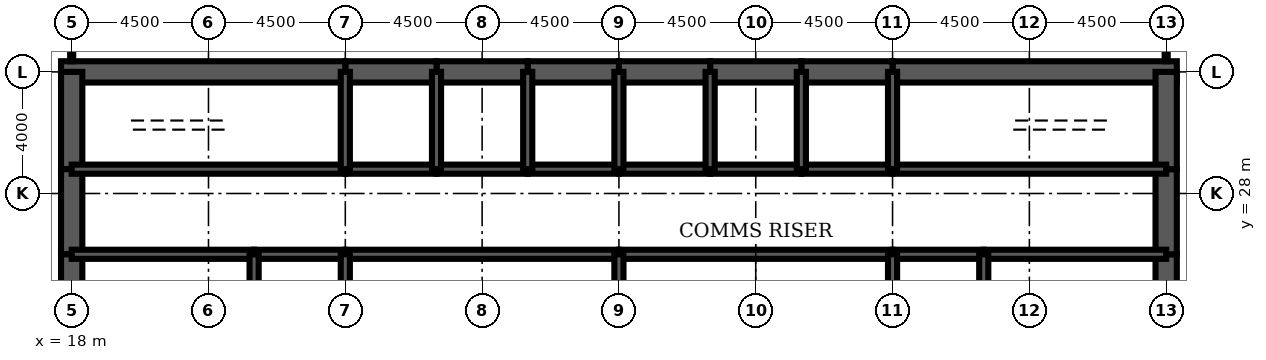
"""IFC4 building model, lengths in metres.
Left out: names, types, materials, properties, quantities, classifications, styles, units other than length and angle.
Written with IfcOpenShell. Run it as: python <this file> out.ifc"""

import sys

from ifc_helpers import new_model, si_unit, direction, frame, frame_2d, origin, place, context, subcontext, project, spatial, rectangle, extrude, element, fill, save


model = new_model("IFC4")
c1 = context("Model", 3, precision=1e-05, world=origin(), true_north=direction((0.0, 1.0)))
c2 = subcontext(c1, "Body", "Model", "MODEL_VIEW")
j1 = project(units=[si_unit("LENGTHUNIT", "METRE"), si_unit("PLANEANGLEUNIT", "RADIAN")], contexts=[c1])
p1 = place(None, origin())
s1 = spatial("IfcSite", under=j1, at=p1, CompositionType="ELEMENT")
p2 = place(p1, origin())
s2 = spatial("IfcBuilding", under=s1, at=p2, CompositionType="ELEMENT")
p3 = place(p2, frame((0.0, 0.0, 279.5)))
s3 = spatial("IfcBuildingStorey", under=s2, at=p3, CompositionType="ELEMENT", Elevation=279.5)
p4 = place(p3, frame((54.35, 32.0, 0.0), z_axis=(0.0, 0.0, 1.0), x_axis=(-1.0, 0.0, 0.0)))
e1 = element("IfcWall", 1, at=p4, inside=s3, PredefinedType="SHEAR", context=c2, shape_type="SweptSolid", body=[
    extrude(rectangle(XDim=9.35, YDim=0.7, at=frame_2d((4.675, 0.0))), origin(), (0.0, 0.0, 1.0), 4.2),
])
for number, where, z_axis, x_axis in (
    (2, (45.0, 32.0, 0.0), (0.0, 0.0, 1.0), (-1.0, 0.0, 0.0)),
    (3, (42.0, 32.0, 0.0), (0.0, 0.0, 1.0), (-1.0, 0.0, 0.0)),
    (4, (39.0, 32.0, 0.0), (0.0, 0.0, 1.0), (-1.0, 0.0, 0.0)),
    (5, (36.0, 32.0, 0.0), (0.0, 0.0, 1.0), (-1.0, 0.0, 0.0)),
    (6, (33.0, 32.0, 0.0), (0.0, 0.0, 1.0), (-1.0, 0.0, 0.0)),
    (7, (30.0, 32.0, 0.0), (0.0, 0.0, 1.0), (-1.0, 0.0, 0.0)),
):
    element("IfcWall", number, at=place(p3, frame(where, z_axis=z_axis, x_axis=x_axis)), inside=s3, PredefinedType="SHEAR", context=c2, shape_type="SweptSolid", body=[
        extrude(rectangle(XDim=3.0, YDim=0.7, at=frame_2d((1.5, 0.0))), origin(), (0.0, 0.0, 1.0), 4.2),
    ])
p5 = place(p3, frame((27.0, 32.0, 0.0), z_axis=(0.0, 0.0, 1.0), x_axis=(-1.0, 0.0, 0.0)))
e8 = element("IfcWall", 8, at=p5, inside=s3, PredefinedType="SHEAR", context=c2, shape_type="SweptSolid", body=[
    extrude(rectangle(XDim=9.35, YDim=0.7, at=frame_2d((4.675, 0.0))), origin(), (0.0, 0.0, 1.0), 4.2),
])
p6 = place(p3, frame((18.0, 32.0, 0.0), z_axis=(0.0, 0.0, 1.0), x_axis=(0.0, -1.0, 0.0)))
e9 = element("IfcWall", 9, at=p6, inside=s3, PredefinedType="SHEAR", context=c2, shape_type="SweptSolid", body=[
    extrude(rectangle(XDim=3.2, YDim=0.7, at=frame_2d((1.6, 0.0))), origin(), (0.0, 0.0, 1.0), 4.2),
])
p7 = place(p3, frame((18.0, 28.8, 0.0), z_axis=(0.0, 0.0, 1.0), x_axis=(0.0, -1.0, 0.0)))
e10 = element("IfcWall", 10, at=p7, inside=s3, PredefinedType="SHEAR", context=c2, shape_type="SweptSolid", body=[
    extrude(rectangle(XDim=2.8, YDim=0.7, at=frame_2d((1.4, 0.0))), origin(), (0.0, 0.0, 1.0), 4.2),
])
p8 = place(p7, frame((0.4, 0.0, 0.0)))
e11 = element("IfcOpeningElement", 11, at=p8, cuts=e10, PredefinedType="OPENING", context=c2, shape_type="SweptSolid", body=[
    extrude(rectangle(XDim=1.8, YDim=2.1, at=frame_2d((0.9, 1.05))), frame((0.0, 0.36, 0.0), z_axis=(0.0, -1.0, 0.0), x_axis=(1.0, 0.0, 0.0)), (0.0, 0.0, 1.0), 0.72),
])
for number, where, z_axis, x_axis in (
    (12, (18.0, 26.0, 0.0), (0.0, 0.0, 1.0), (0.0, -1.0, 0.0)),
    (13, (54.0, 22.0, 0.0), (0.0, 0.0, 1.0), (0.0, 1.0, 0.0)),
):
    element("IfcWall", number, at=place(p3, frame(where, z_axis=z_axis, x_axis=x_axis)), inside=s3, PredefinedType="SHEAR", context=c2, shape_type="SweptSolid", body=[
        extrude(rectangle(XDim=4.0, YDim=0.7, at=frame_2d((2.0, 0.0))), origin(), (0.0, 0.0, 1.0), 4.2),
    ])
p9 = place(p3, frame((54.0, 26.0, 0.0), z_axis=(0.0, 0.0, 1.0), x_axis=(0.0, 1.0, 0.0)))
e14 = element("IfcWall", 14, at=p9, inside=s3, PredefinedType="SHEAR", context=c2, shape_type="SweptSolid", body=[
    extrude(rectangle(XDim=2.8, YDim=0.7, at=frame_2d((1.4, 0.0))), origin(), (0.0, 0.0, 1.0), 4.2),
])
p10 = place(p9, frame((0.6, 0.0, 0.0)))
e15 = element("IfcOpeningElement", 15, at=p10, cuts=e14, PredefinedType="OPENING", context=c2, shape_type="SweptSolid", body=[
    extrude(rectangle(XDim=1.8, YDim=2.1, at=frame_2d((0.9, 1.05))), frame((0.0, 0.36, 0.0), z_axis=(0.0, -1.0, 0.0), x_axis=(1.0, 0.0, 0.0)), (0.0, 0.0, 1.0), 0.72),
])
p11 = place(p3, frame((54.0, 28.8, 0.0), z_axis=(0.0, 0.0, 1.0), x_axis=(0.0, 1.0, 0.0)))
e16 = element("IfcWall", 16, at=p11, inside=s3, PredefinedType="SHEAR", context=c2, shape_type="SweptSolid", body=[
    extrude(rectangle(XDim=3.2, YDim=0.7, at=frame_2d((1.6, 0.0))), origin(), (0.0, 0.0, 1.0), 4.2),
])
p12 = place(p3, frame((18.0, 28.8, 0.0), z_axis=(0.0, 0.0, 1.0), x_axis=(1.0, 0.0, 0.0)))
e17 = element("IfcWall", 17, at=p12, inside=s3, PredefinedType="SOLIDWALL", context=c2, shape_type="SweptSolid", body=[
    extrude(rectangle(XDim=9.0, YDim=0.3, at=frame_2d((4.5, 0.0))), origin(), (0.0, 0.0, 1.0), 4.2),
])
p13 = place(p12, frame((0.65, 0.0, 0.0)))
e18 = element("IfcOpeningElement", 18, at=p13, cuts=e17, PredefinedType="OPENING", context=c2, shape_type="SweptSolid", body=[
    extrude(rectangle(XDim=1.0, YDim=2.1, at=frame_2d((0.5, 1.05))), frame((0.0, 0.16, 0.0), z_axis=(0.0, -1.0, 0.0), x_axis=(1.0, 0.0, 0.0)), (0.0, 0.0, 1.0), 0.32),
])
p14 = place(p3, frame((27.0, 28.8, 0.0), z_axis=(0.0, 0.0, 1.0), x_axis=(1.0, 0.0, 0.0)))
e19 = element("IfcWall", 19, at=p14, inside=s3, PredefinedType="SOLIDWALL", context=c2, shape_type="SweptSolid", body=[
    extrude(rectangle(XDim=3.0, YDim=0.3, at=frame_2d((1.5, 0.0))), origin(), (0.0, 0.0, 1.0), 4.2),
])
p15 = place(p14, frame((0.95, 0.0, 0.0)))
e20 = element("IfcOpeningElement", 20, at=p15, cuts=e19, PredefinedType="OPENING", context=c2, shape_type="SweptSolid", body=[
    extrude(rectangle(XDim=1.1, YDim=2.2, at=frame_2d((0.55, 1.1))), frame((0.0, 0.16, 0.0), z_axis=(0.0, -1.0, 0.0), x_axis=(1.0, 0.0, 0.0)), (0.0, 0.0, 1.0), 0.32),
])
p16 = place(p3, frame((30.0, 28.8, 0.0), z_axis=(0.0, 0.0, 1.0), x_axis=(1.0, 0.0, 0.0)))
e21 = element("IfcWall", 21, at=p16, inside=s3, PredefinedType="SOLIDWALL", context=c2, shape_type="SweptSolid", body=[
    extrude(rectangle(XDim=3.0, YDim=0.3, at=frame_2d((1.5, 0.0))), origin(), (0.0, 0.0, 1.0), 4.2),
])
p17 = place(p16, frame((0.95, 0.0, 0.0)))
e22 = element("IfcOpeningElement", 22, at=p17, cuts=e21, PredefinedType="OPENING", context=c2, shape_type="SweptSolid", body=[
    extrude(rectangle(XDim=1.1, YDim=2.2, at=frame_2d((0.55, 1.1))), frame((0.0, 0.16, 0.0), z_axis=(0.0, -1.0, 0.0), x_axis=(1.0, 0.0, 0.0)), (0.0, 0.0, 1.0), 0.32),
])
p18 = place(p3, frame((33.0, 28.8, 0.0), z_axis=(0.0, 0.0, 1.0), x_axis=(1.0, 0.0, 0.0)))
e23 = element("IfcWall", 23, at=p18, inside=s3, PredefinedType="SOLIDWALL", context=c2, shape_type="SweptSolid", body=[
    extrude(rectangle(XDim=3.0, YDim=0.3, at=frame_2d((1.5, 0.0))), origin(), (0.0, 0.0, 1.0), 4.2),
])
p19 = place(p18, frame((0.95, 0.0, 0.0)))
e24 = element("IfcOpeningElement", 24, at=p19, cuts=e23, PredefinedType="OPENING", context=c2, shape_type="SweptSolid", body=[
    extrude(rectangle(XDim=1.1, YDim=2.2, at=frame_2d((0.55, 1.1))), frame((0.0, 0.16, 0.0), z_axis=(0.0, -1.0, 0.0), x_axis=(1.0, 0.0, 0.0)), (0.0, 0.0, 1.0), 0.32),
])
p20 = place(p3, frame((36.0, 28.8, 0.0), z_axis=(0.0, 0.0, 1.0), x_axis=(1.0, 0.0, 0.0)))
e25 = element("IfcWall", 25, at=p20, inside=s3, PredefinedType="SOLIDWALL", context=c2, shape_type="SweptSolid", body=[
    extrude(rectangle(XDim=3.0, YDim=0.3, at=frame_2d((1.5, 0.0))), origin(), (0.0, 0.0, 1.0), 4.2),
])
p21 = place(p20, frame((1.0, 0.0, 0.0)))
e26 = element("IfcOpeningElement", 26, at=p21, cuts=e25, PredefinedType="OPENING", context=c2, shape_type="SweptSolid", body=[
    extrude(rectangle(XDim=1.0, YDim=2.1, at=frame_2d((0.5, 1.05))), frame((0.0, 0.16, 0.0), z_axis=(0.0, -1.0, 0.0), x_axis=(1.0, 0.0, 0.0)), (0.0, 0.0, 1.0), 0.32),
])
p22 = place(p3, frame((39.0, 28.8, 0.0), z_axis=(0.0, 0.0, 1.0), x_axis=(1.0, 0.0, 0.0)))
e27 = element("IfcWall", 27, at=p22, inside=s3, PredefinedType="SOLIDWALL", context=c2, shape_type="SweptSolid", body=[
    extrude(rectangle(XDim=3.0, YDim=0.3, at=frame_2d((1.5, 0.0))), origin(), (0.0, 0.0, 1.0), 4.2),
])
p23 = place(p22, frame((1.0, 0.0, 0.0)))
e28 = element("IfcOpeningElement", 28, at=p23, cuts=e27, PredefinedType="OPENING", context=c2, shape_type="SweptSolid", body=[
    extrude(rectangle(XDim=1.0, YDim=2.1, at=frame_2d((0.5, 1.05))), frame((0.0, 0.16, 0.0), z_axis=(0.0, -1.0, 0.0), x_axis=(1.0, 0.0, 0.0)), (0.0, 0.0, 1.0), 0.32),
])
p24 = place(p3, frame((42.0, 28.8, 0.0), z_axis=(0.0, 0.0, 1.0), x_axis=(1.0, 0.0, 0.0)))
e29 = element("IfcWall", 29, at=p24, inside=s3, PredefinedType="SOLIDWALL", context=c2, shape_type="SweptSolid", body=[
    extrude(rectangle(XDim=3.0, YDim=0.3, at=frame_2d((1.5, 0.0))), origin(), (0.0, 0.0, 1.0), 4.2),
])
p25 = place(p24, frame((0.95, 0.0, 0.0)))
e30 = element("IfcOpeningElement", 30, at=p25, cuts=e29, PredefinedType="OPENING", context=c2, shape_type="SweptSolid", body=[
    extrude(rectangle(XDim=1.1, YDim=2.2, at=frame_2d((0.55, 1.1))), frame((0.0, 0.16, 0.0), z_axis=(0.0, -1.0, 0.0), x_axis=(1.0, 0.0, 0.0)), (0.0, 0.0, 1.0), 0.32),
])
p26 = place(p3, frame((45.0, 28.8, 0.0), z_axis=(0.0, 0.0, 1.0), x_axis=(1.0, 0.0, 0.0)))
e31 = element("IfcWall", 31, at=p26, inside=s3, PredefinedType="SOLIDWALL", context=c2, shape_type="SweptSolid", body=[
    extrude(rectangle(XDim=9.0, YDim=0.3, at=frame_2d((4.5, 0.0))), origin(), (0.0, 0.0, 1.0), 4.2),
])
p27 = place(p26, frame((7.35, 0.0, 0.0)))
e32 = element("IfcOpeningElement", 32, at=p27, cuts=e31, PredefinedType="OPENING", context=c2, shape_type="SweptSolid", body=[
    extrude(rectangle(XDim=1.0, YDim=2.1, at=frame_2d((0.5, 1.05))), frame((0.0, 0.16, 0.0), z_axis=(0.0, -1.0, 0.0), x_axis=(1.0, 0.0, 0.0)), (0.0, 0.0, 1.0), 0.32),
])
p28 = place(p3, frame((18.0, 26.0, 0.0), z_axis=(0.0, 0.0, 1.0), x_axis=(1.0, 0.0, 0.0)))
e33 = element("IfcWall", 33, at=p28, inside=s3, PredefinedType="SOLIDWALL", context=c2, shape_type="SweptSolid", body=[
    extrude(rectangle(XDim=6.0, YDim=0.3, at=frame_2d((3.0, 0.0))), origin(), (0.0, 0.0, 1.0), 4.2),
])
p29 = place(p3, frame((24.0, 26.0, 0.0), z_axis=(0.0, 0.0, 1.0), x_axis=(1.0, 0.0, 0.0)))
e34 = element("IfcWall", 34, at=p29, inside=s3, PredefinedType="SOLIDWALL", context=c2, shape_type="SweptSolid", body=[
    extrude(rectangle(XDim=3.0, YDim=0.3, at=frame_2d((1.5, 0.0))), origin(), (0.0, 0.0, 1.0), 4.2),
])
for number, where, z_axis, x_axis in (
    (35, (27.0, 26.0, 0.0), (0.0, 0.0, 1.0), (1.0, 0.0, 0.0)),
    (36, (36.0, 26.0, 0.0), (0.0, 0.0, 1.0), (1.0, 0.0, 0.0)),
):
    element("IfcWall", number, at=place(p3, frame(where, z_axis=z_axis, x_axis=x_axis)), inside=s3, PredefinedType="SOLIDWALL", context=c2, shape_type="SweptSolid", body=[
        extrude(rectangle(XDim=9.0, YDim=0.3, at=frame_2d((4.5, 0.0))), origin(), (0.0, 0.0, 1.0), 4.2),
    ])
p30 = place(p3, frame((45.0, 26.0, 0.0), z_axis=(0.0, 0.0, 1.0), x_axis=(1.0, 0.0, 0.0)))
e37 = element("IfcWall", 37, at=p30, inside=s3, PredefinedType="SOLIDWALL", context=c2, shape_type="SweptSolid", body=[
    extrude(rectangle(XDim=3.0, YDim=0.3, at=frame_2d((1.5, 0.0))), origin(), (0.0, 0.0, 1.0), 4.2),
])
p31 = place(p3, frame((48.0, 26.0, 0.0), z_axis=(0.0, 0.0, 1.0), x_axis=(1.0, 0.0, 0.0)))
e38 = element("IfcWall", 38, at=p31, inside=s3, PredefinedType="SOLIDWALL", context=c2, shape_type="SweptSolid", body=[
    extrude(rectangle(XDim=6.0, YDim=0.3, at=frame_2d((3.0, 0.0))), origin(), (0.0, 0.0, 1.0), 4.2),
])
for number, where, z_axis, x_axis in (
    (39, (27.0, 28.8, 0.0), (0.0, 0.0, 1.0), (0.0, 1.0, 0.0)),
    (40, (30.0, 28.8, 0.0), (0.0, 0.0, 1.0), (0.0, 1.0, 0.0)),
    (41, (33.0, 28.8, 0.0), (0.0, 0.0, 1.0), (0.0, 1.0, 0.0)),
    (42, (36.0, 28.8, 0.0), (0.0, 0.0, 1.0), (0.0, 1.0, 0.0)),
    (43, (39.0, 28.8, 0.0), (0.0, 0.0, 1.0), (0.0, 1.0, 0.0)),
    (44, (42.0, 28.8, 0.0), (0.0, 0.0, 1.0), (0.0, 1.0, 0.0)),
    (45, (45.0, 28.8, 0.0), (0.0, 0.0, 1.0), (0.0, 1.0, 0.0)),
):
    element("IfcWall", number, at=place(p3, frame(where, z_axis=z_axis, x_axis=x_axis)), inside=s3, PredefinedType="SOLIDWALL", context=c2, shape_type="SweptSolid", body=[
        extrude(rectangle(XDim=3.2, YDim=0.3, at=frame_2d((1.6, 0.0))), origin(), (0.0, 0.0, 1.0), 4.2),
    ])
for number, where, z_axis, x_axis in (
    (46, (24.0, 22.0, 0.0), (0.0, 0.0, 1.0), (0.0, 1.0, 0.0)),
    (47, (27.0, 22.0, 0.0), (0.0, 0.0, 1.0), (0.0, 1.0, 0.0)),
    (48, (36.0, 22.0, 0.0), (0.0, 0.0, 1.0), (0.0, 1.0, 0.0)),
    (49, (45.0, 22.0, 0.0), (0.0, 0.0, 1.0), (0.0, 1.0, 0.0)),
    (50, (48.0, 22.0, 0.0), (0.0, 0.0, 1.0), (0.0, 1.0, 0.0)),
):
    element("IfcWall", number, at=place(p3, frame(where, z_axis=z_axis, x_axis=x_axis)), inside=s3, PredefinedType="SOLIDWALL", context=c2, shape_type="SweptSolid", body=[
        extrude(rectangle(XDim=4.0, YDim=0.3, at=frame_2d((2.0, 0.0))), origin(), (0.0, 0.0, 1.0), 4.2),
    ])
p32 = place(p3, frame((42.5, 22.15, 0.0), z_axis=(0.0, 0.0, 1.0), x_axis=(0.0, 1.0, 0.0)))
e51 = element("IfcWall", 51, at=p32, inside=s3, PredefinedType="PARTITIONING", context=c2, shape_type="SweptSolid", body=[
    extrude(rectangle(XDim=3.7, YDim=0.15, at=frame_2d((1.85, 0.0))), origin(), (0.0, 0.0, 1.0), 3.0),
])
p33 = place(p32, frame((2.2, 0.0, 0.0)))
e52 = element("IfcOpeningElement", 52, at=p33, cuts=e51, PredefinedType="OPENING", context=c2, shape_type="SweptSolid", body=[
    extrude(rectangle(XDim=1.0, YDim=2.1, at=frame_2d((0.5, 1.05))), frame((0.0, 0.085, 0.0), z_axis=(0.0, -1.0, 0.0), x_axis=(1.0, 0.0, 0.0)), (0.0, 0.0, 1.0), 0.17),
])
p34 = place(p3, frame((51.475, 22.15, 0.0), z_axis=(0.0, 0.0, 1.0), x_axis=(0.0, 1.0, 0.0)))
e53 = element("IfcWall", 53, at=p34, inside=s3, PredefinedType="PARTITIONING", context=c2, shape_type="SweptSolid", body=[
    extrude(rectangle(XDim=3.7, YDim=0.15, at=frame_2d((1.85, 0.0))), origin(), (0.0, 0.0, 1.0), 3.0),
])
p35 = place(p3, frame((22.2, 26.15, 0.0), z_axis=(0.0, 0.0, 1.0), x_axis=(0.0, 1.0, 0.0)))
e54 = element("IfcWall", 54, at=p35, inside=s3, PredefinedType="PARTITIONING", context=c2, shape_type="SweptSolid", body=[
    extrude(rectangle(XDim=2.5, YDim=0.15, at=frame_2d((1.25, 0.0))), origin(), (0.0, 0.0, 1.0), 3.0),
])
p36 = place(p35, frame((0.35, 0.0, 0.0)))
e55 = element("IfcOpeningElement", 55, at=p36, cuts=e54, PredefinedType="OPENING", context=c2, shape_type="SweptSolid", body=[
    extrude(rectangle(XDim=1.0, YDim=2.1, at=frame_2d((0.5, 1.05))), frame((0.0, 0.085, 0.0), z_axis=(0.0, -1.0, 0.0), x_axis=(1.0, 0.0, 0.0)), (0.0, 0.0, 1.0), 0.17),
])
p37 = place(p3, frame((18.0, 32.35, 0.0), z_axis=(0.0, 0.0, 1.0), x_axis=(0.0, 1.0, 0.0)))
e56 = element("IfcWall", 56, at=p37, inside=s3, PredefinedType="PARTITIONING", context=c2, shape_type="SweptSolid", body=[
    extrude(rectangle(XDim=5.7, YDim=0.1, at=frame_2d((2.85, 0.0))), origin(), (0.0, 0.0, 1.0), 3.0),
])
p38 = place(p37, frame((2.05, 0.0, 0.0)))
e57 = element("IfcOpeningElement", 57, at=p38, cuts=e56, PredefinedType="OPENING", context=c2, shape_type="SweptSolid", body=[
    extrude(rectangle(XDim=1.6, YDim=2.1, at=frame_2d((0.8, 1.05))), frame((0.0, 0.06, 0.0), z_axis=(0.0, -1.0, 0.0), x_axis=(1.0, 0.0, 0.0)), (0.0, 0.0, 1.0), 0.12),
])
p39 = place(p3, frame((54.0, 32.35, 0.0), z_axis=(0.0, 0.0, 1.0), x_axis=(0.0, 1.0, 0.0)))
e58 = element("IfcWall", 58, at=p39, inside=s3, PredefinedType="PARTITIONING", context=c2, shape_type="SweptSolid", body=[
    extrude(rectangle(XDim=5.7, YDim=0.1, at=frame_2d((2.85, 0.0))), origin(), (0.0, 0.0, 1.0), 3.0),
])
p40 = place(p39, frame((2.05, 0.0, 0.0)))
e59 = element("IfcOpeningElement", 59, at=p40, cuts=e58, PredefinedType="OPENING", context=c2, shape_type="SweptSolid", body=[
    extrude(rectangle(XDim=1.6, YDim=2.1, at=frame_2d((0.8, 1.05))), frame((0.0, 0.06, 0.0), z_axis=(0.0, -1.0, 0.0), x_axis=(1.0, 0.0, 0.0)), (0.0, 0.0, 1.0), 0.12),
])
p41 = place(p33, origin())
e60 = element("IfcDoor", 60, at=p41, inside=s3, OperationType="SINGLE_SWING_RIGHT", PredefinedType="DOOR", context=c2, shape_type="SweptSolid", body=[
    extrude(rectangle(XDim=1.0, YDim=2.1, at=frame_2d((0.5, 1.05))), frame((0.0, 0.025, 0.0), z_axis=(0.0, -1.0, 0.0), x_axis=(1.0, 0.0, 0.0)), (0.0, 0.0, 1.0), 0.05),
])
fill(e52, e60)
p42 = place(p36, origin())
e61 = element("IfcDoor", 61, at=p42, inside=s3, OperationType="SINGLE_SWING_LEFT", PredefinedType="DOOR", context=c2, shape_type="SweptSolid", body=[
    extrude(rectangle(XDim=1.0, YDim=2.1, at=frame_2d((0.5, 1.05))), frame((0.0, 0.025, 0.0), z_axis=(0.0, -1.0, 0.0), x_axis=(1.0, 0.0, 0.0)), (0.0, 0.0, 1.0), 0.05),
])
fill(e55, e61)
p43 = place(p25, origin())
e62 = element("IfcDoor", 62, at=p43, inside=s3, OperationType="DOUBLE_DOOR_SLIDING", PredefinedType="USERDEFINED", context=c2, shape_type="SweptSolid", body=[
    extrude(rectangle(XDim=1.1, YDim=2.2, at=frame_2d((0.55, 1.1))), frame((0.0, 0.025, 0.0), z_axis=(0.0, -1.0, 0.0), x_axis=(1.0, 0.0, 0.0)), (0.0, 0.0, 1.0), 0.05),
])
fill(e30, e62)
p44 = place(p15, origin())
e63 = element("IfcDoor", 63, at=p44, inside=s3, OperationType="DOUBLE_DOOR_SLIDING", PredefinedType="USERDEFINED", context=c2, shape_type="SweptSolid", body=[
    extrude(rectangle(XDim=1.1, YDim=2.2, at=frame_2d((0.55, 1.1))), frame((0.0, 0.025, 0.0), z_axis=(0.0, -1.0, 0.0), x_axis=(1.0, 0.0, 0.0)), (0.0, 0.0, 1.0), 0.05),
])
fill(e20, e63)
p45 = place(p17, origin())
e64 = element("IfcDoor", 64, at=p45, inside=s3, OperationType="DOUBLE_DOOR_SLIDING", PredefinedType="USERDEFINED", context=c2, shape_type="SweptSolid", body=[
    extrude(rectangle(XDim=1.1, YDim=2.2, at=frame_2d((0.55, 1.1))), frame((0.0, 0.025, 0.0), z_axis=(0.0, -1.0, 0.0), x_axis=(1.0, 0.0, 0.0)), (0.0, 0.0, 1.0), 0.05),
])
fill(e22, e64)
p46 = place(p19, origin())
e65 = element("IfcDoor", 65, at=p46, inside=s3, OperationType="DOUBLE_DOOR_SLIDING", PredefinedType="USERDEFINED", context=c2, shape_type="SweptSolid", body=[
    extrude(rectangle(XDim=1.1, YDim=2.2, at=frame_2d((0.55, 1.1))), frame((0.0, 0.025, 0.0), z_axis=(0.0, -1.0, 0.0), x_axis=(1.0, 0.0, 0.0)), (0.0, 0.0, 1.0), 0.05),
])
fill(e24, e65)
p47 = place(p13, origin())
e66 = element("IfcDoor", 66, at=p47, inside=s3, OperationType="SINGLE_SWING_LEFT", PredefinedType="DOOR", context=c2, shape_type="SweptSolid", body=[
    extrude(rectangle(XDim=1.0, YDim=2.1, at=frame_2d((0.5, 1.05))), frame((0.0, 0.025, 0.0), z_axis=(0.0, -1.0, 0.0), x_axis=(1.0, 0.0, 0.0)), (0.0, 0.0, 1.0), 0.05),
])
fill(e18, e66)
p48 = place(p27, origin())
e67 = element("IfcDoor", 67, at=p48, inside=s3, OperationType="SINGLE_SWING_RIGHT", PredefinedType="DOOR", context=c2, shape_type="SweptSolid", body=[
    extrude(rectangle(XDim=1.0, YDim=2.1, at=frame_2d((0.5, 1.05))), frame((0.0, 0.025, 0.0), z_axis=(0.0, -1.0, 0.0), x_axis=(1.0, 0.0, 0.0)), (0.0, 0.0, 1.0), 0.05),
])
fill(e32, e67)
p49 = place(p8, origin())
e68 = element("IfcDoor", 68, at=p49, inside=s3, OperationType="SINGLE_SWING_LEFT", PredefinedType="DOOR", context=c2, shape_type="SweptSolid", body=[
    extrude(rectangle(XDim=1.8, YDim=2.1, at=frame_2d((0.9, 1.05))), frame((0.0, 0.35, 0.0), z_axis=(0.0, -1.0, 0.0), x_axis=(1.0, 0.0, 0.0)), (0.0, 0.0, 1.0), 0.699),
])
fill(e11, e68)
p50 = place(p10, origin())
e69 = element("IfcDoor", 69, at=p50, inside=s3, OperationType="SINGLE_SWING_LEFT", PredefinedType="DOOR", context=c2, shape_type="SweptSolid", body=[
    extrude(rectangle(XDim=1.8, YDim=2.1, at=frame_2d((0.9, 1.05))), frame((0.0, 0.35, 0.0), z_axis=(0.0, -1.0, 0.0), x_axis=(1.0, 0.0, 0.0)), (0.0, 0.0, 1.0), 0.699),
])
fill(e15, e69)
p51 = place(p21, origin())
e70 = element("IfcDoor", 70, at=p51, inside=s3, OperationType="SINGLE_SWING_LEFT", PredefinedType="DOOR", context=c2, shape_type="SweptSolid", body=[
    extrude(rectangle(XDim=1.0, YDim=2.1, at=frame_2d((0.5, 1.05))), frame((0.0, 0.025, 0.0), z_axis=(0.0, -1.0, 0.0), x_axis=(1.0, 0.0, 0.0)), (0.0, 0.0, 1.0), 0.05),
])
fill(e26, e70)
p52 = place(p23, origin())
e71 = element("IfcDoor", 71, at=p52, inside=s3, OperationType="SINGLE_SWING_LEFT", PredefinedType="DOOR", context=c2, shape_type="SweptSolid", body=[
    extrude(rectangle(XDim=1.0, YDim=2.1, at=frame_2d((0.5, 1.05))), frame((0.0, 0.025, 0.0), z_axis=(0.0, -1.0, 0.0), x_axis=(1.0, 0.0, 0.0)), (0.0, 0.0, 1.0), 0.05),
])
fill(e28, e71)
save(model, sys.argv[1])
